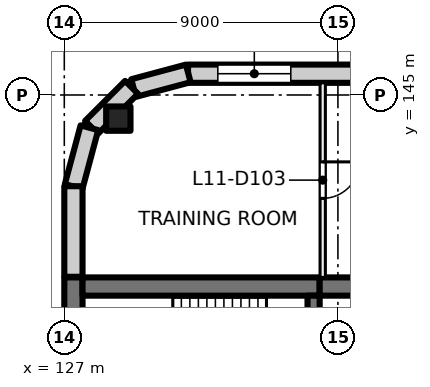
"""IFC4 building model, lengths in metres.
Left out: names, types, materials, properties, quantities, classifications, styles, units other than length and angle.
Written with IfcOpenShell. Run it as: python <this file> out.ifc"""

import sys

from ifc_helpers import new_model, si_unit, direction, frame, frame_2d, origin, origin_2d, place, context, subcontext, project, spatial, rectangle, extrude, element, fill, save


model = new_model("IFC4")
c1 = context("Model", 3, precision=1e-05, world=origin(), true_north=direction((0.0, 1.0)))
c2 = subcontext(c1, "Body", "Model", "MODEL_VIEW")
j1 = project(units=[si_unit("LENGTHUNIT", "METRE"), si_unit("PLANEANGLEUNIT", "RADIAN")], contexts=[c1])
p1 = place(None, origin())
s1 = spatial("IfcSite", under=j1, at=p1, CompositionType="ELEMENT")
p2 = place(p1, origin())
s2 = spatial("IfcBuilding", under=s1, at=p2, CompositionType="ELEMENT")
p3 = place(p2, frame((0.0, 0.0, 51.5)))
s3 = spatial("IfcBuildingStorey", under=s2, at=p3, CompositionType="ELEMENT", Elevation=51.5)
p4 = place(p3, frame((128.777, 144.223, 0.0), z_axis=(0.0, 0.0, 1.0), x_axis=(1.0, 0.0, 0.0)))
e1 = element("IfcColumn", 1, at=p4, inside=s3, PredefinedType="COLUMN", context=c2, shape_type="SweptSolid", body=[
    extrude(rectangle(XDim=0.8, YDim=0.8, at=origin_2d()), origin(), (0.0, 0.0, 1.0), 4.0),
])
p5 = place(p3, frame((127.3, 135.2, 0.0), z_axis=(0.0, 0.0, 1.0), x_axis=(0.0, 1.0, 0.0)))
e2 = element("IfcWall", 2, at=p5, inside=s3, PredefinedType="SHEAR", context=c2, shape_type="SweptSolid", body=[
    extrude(rectangle(XDim=3.8, YDim=0.6, at=frame_2d((1.9, 0.0))), origin(), (0.0, 0.0, 1.0), 4.0),
])
p6 = place(p3, frame((127.6, 138.7, 0.0), z_axis=(0.0, 0.0, 1.0), x_axis=(1.0, 0.0, 0.0)))
e3 = element("IfcWall", 3, at=p6, inside=s3, PredefinedType="SHEAR", context=c2, shape_type="SweptSolid", body=[
    extrude(rectangle(XDim=7.8, YDim=0.6, at=frame_2d((3.9, 0.0))), origin(), (0.0, 0.0, 1.0), 4.0),
])
p7 = place(p3, frame((135.4, 138.7, 0.0), z_axis=(0.0, 0.0, 1.0), x_axis=(1.0, 0.0, 0.0)))
e4 = element("IfcWall", 4, at=p7, inside=s3, PredefinedType="SHEAR", context=c2, shape_type="SweptSolid", body=[
    extrude(rectangle(XDim=4.6, YDim=0.6, at=frame_2d((2.3, 0.0))), origin(), (0.0, 0.0, 1.0), 4.0),
])
p8 = place(p3, frame((135.2, 135.6, 0.0), z_axis=(0.0, 0.0, 1.0), x_axis=(0.0, 1.0, 0.0)))
e5 = element("IfcWall", 5, at=p8, inside=s3, PredefinedType="SHEAR", context=c2, shape_type="SweptSolid", body=[
    extrude(rectangle(XDim=2.8, YDim=0.4, at=frame_2d((1.4, 0.0))), origin(), (0.0, 0.0, 1.0), 4.0),
])
p9 = place(p8, frame((0.9, 0.0, 0.0)))
e6 = element("IfcOpeningElement", 6, at=p9, cuts=e5, PredefinedType="OPENING", context=c2, shape_type="SweptSolid", body=[
    extrude(rectangle(XDim=1.0, YDim=2.1, at=frame_2d((0.5, 1.05))), frame((0.0, 0.21, 0.0), z_axis=(0.0, -1.0, 0.0), x_axis=(1.0, 0.0, 0.0)), (0.0, 0.0, 1.0), 0.42),
])
p10 = place(p3, frame((131.07, 145.7, 0.0), z_axis=(0.0, 0.0, 1.0), x_axis=(1.0, 0.0, 0.0)))
e7 = element("IfcWall", 7, at=p10, inside=s3, PredefinedType="SOLIDWALL", context=c2, shape_type="SweptSolid", body=[
    extrude(rectangle(XDim=31.93, YDim=0.6, at=frame_2d((15.965, 0.0))), origin(), (0.0, 0.0, 1.0), 3.625),
])
p11 = place(p10, frame((0.98, 0.0, 0.9)))
e8 = element("IfcOpeningElement", 8, at=p11, cuts=e7, PredefinedType="OPENING", context=c2, shape_type="SweptSolid", body=[
    extrude(rectangle(XDim=2.4, YDim=2.4, at=frame_2d((1.2, 1.2))), frame((0.0, 0.31, 0.0), z_axis=(0.0, -1.0, 0.0), x_axis=(1.0, 0.0, 0.0)), (0.0, 0.0, 1.0), 0.62),
])
p12 = place(p10, frame((5.48, 0.0, 0.9)))
e9 = element("IfcOpeningElement", 9, at=p12, cuts=e7, PredefinedType="OPENING", context=c2, shape_type="SweptSolid", body=[
    extrude(rectangle(XDim=2.4, YDim=2.4, at=frame_2d((1.2, 1.2))), frame((0.0, 0.31, 0.0), z_axis=(0.0, -1.0, 0.0), x_axis=(1.0, 0.0, 0.0)), (0.0, 0.0, 1.0), 0.62),
])
p13 = place(p10, frame((9.98, 0.0, 0.9)))
e10 = element("IfcOpeningElement", 10, at=p13, cuts=e7, PredefinedType="OPENING", context=c2, shape_type="SweptSolid", body=[
    extrude(rectangle(XDim=2.4, YDim=2.4, at=frame_2d((1.2, 1.2))), frame((0.0, 0.31, 0.0), z_axis=(0.0, -1.0, 0.0), x_axis=(1.0, 0.0, 0.0)), (0.0, 0.0, 1.0), 0.62),
])
p14 = place(p10, frame((14.48, 0.0, 0.9)))
e11 = element("IfcOpeningElement", 11, at=p14, cuts=e7, PredefinedType="OPENING", context=c2, shape_type="SweptSolid", body=[
    extrude(rectangle(XDim=2.4, YDim=2.4, at=frame_2d((1.2, 1.2))), frame((0.0, 0.31, 0.0), z_axis=(0.0, -1.0, 0.0), x_axis=(1.0, 0.0, 0.0)), (0.0, 0.0, 1.0), 0.62),
])
p15 = place(p10, frame((18.98, 0.0, 0.9)))
e12 = element("IfcOpeningElement", 12, at=p15, cuts=e7, PredefinedType="OPENING", context=c2, shape_type="SweptSolid", body=[
    extrude(rectangle(XDim=2.4, YDim=2.4, at=frame_2d((1.2, 1.2))), frame((0.0, 0.31, 0.0), z_axis=(0.0, -1.0, 0.0), x_axis=(1.0, 0.0, 0.0)), (0.0, 0.0, 1.0), 0.62),
])
p16 = place(p10, frame((23.48, 0.0, 0.9)))
e13 = element("IfcOpeningElement", 13, at=p16, cuts=e7, PredefinedType="OPENING", context=c2, shape_type="SweptSolid", body=[
    extrude(rectangle(XDim=2.4, YDim=2.4, at=frame_2d((1.2, 1.2))), frame((0.0, 0.31, 0.0), z_axis=(0.0, -1.0, 0.0), x_axis=(1.0, 0.0, 0.0)), (0.0, 0.0, 1.0), 0.62),
])
p17 = place(p10, frame((27.98, 0.0, 0.9)))
e14 = element("IfcOpeningElement", 14, at=p17, cuts=e7, PredefinedType="OPENING", context=c2, shape_type="SweptSolid", body=[
    extrude(rectangle(XDim=2.4, YDim=2.4, at=frame_2d((1.2, 1.2))), frame((0.0, 0.31, 0.0), z_axis=(0.0, -1.0, 0.0), x_axis=(1.0, 0.0, 0.0)), (0.0, 0.0, 1.0), 0.62),
])
for number, where, z_axis, x_axis in (
    (15, (129.281, 145.229, 0.0), (0.0, 0.0, 1.0), (0.966, 0.259, 0.0)),
    (16, (127.896, 143.936, 0.0), (0.0, 0.0, 1.0), (0.707, 0.707, 0.0)),
):
    element("IfcWall", number, at=place(p3, frame(where, z_axis=z_axis, x_axis=x_axis)), inside=s3, PredefinedType="SOLIDWALL", context=c2, shape_type="SweptSolid", body=[
        extrude(rectangle(XDim=1.861, YDim=0.6, at=frame_2d((0.93, 0.0))), origin(), (0.0, 0.0, 1.0), 3.625),
    ])
p18 = place(p3, frame((127.308, 141.99, 0.0), z_axis=(0.0, 0.0, 1.0), x_axis=(0.258839784042, 0.965920269068, 0.0)))
e17 = element("IfcWall", 17, at=p18, inside=s3, PredefinedType="SOLIDWALL", context=c2, shape_type="SweptSolid", body=[
    extrude(rectangle(XDim=2.0, YDim=0.6, at=frame_2d((1.0, 0.0))), origin(), (0.0, 0.0, 1.0), 3.625),
])
p19 = place(p3, frame((127.3, 139.02, 0.0), z_axis=(0.0, 0.0, 1.0), x_axis=(0.0, 1.0, 0.0)))
e18 = element("IfcWall", 18, at=p19, inside=s3, PredefinedType="SOLIDWALL", context=c2, shape_type="SweptSolid", body=[
    extrude(rectangle(XDim=2.98, YDim=0.6, at=frame_2d((1.49, 0.0))), origin(), (0.0, 0.0, 1.0), 3.625),
])
p20 = place(p3, frame((135.5, 145.4, 0.0), z_axis=(0.0, 0.0, 1.0), x_axis=(0.0, -1.0, 0.0)))
e19 = element("IfcWall", 19, at=p20, inside=s3, PredefinedType="PARTITIONING", context=c2, shape_type="SweptSolid", body=[
    extrude(rectangle(XDim=6.4, YDim=0.175, at=frame_2d((3.2, 0.0))), origin(), (0.0, 0.0, 1.0), 3.625),
])
p21 = place(p20, frame((2.6, 0.0, 0.0)))
e20 = element("IfcOpeningElement", 20, at=p21, cuts=e19, PredefinedType="OPENING", context=c2, shape_type="SweptSolid", body=[
    extrude(rectangle(XDim=1.2, YDim=2.1, at=frame_2d((0.6, 1.05))), frame((0.0, 0.097, 0.0), z_axis=(0.0, -1.0, 0.0), x_axis=(1.0, 0.0, 0.0)), (0.0, 0.0, 1.0), 0.195),
])
p22 = place(p11, origin())
e21 = element("IfcWindow", 21, at=p22, inside=s3, PartitioningType="SINGLE_PANEL", PredefinedType="WINDOW", context=c2, shape_type="SweptSolid", body=[
    extrude(rectangle(XDim=2.4, YDim=2.4, at=frame_2d((1.2, 1.2))), frame((0.0, 0.03, 0.0), z_axis=(0.0, -1.0, 0.0), x_axis=(1.0, 0.0, 0.0)), (0.0, 0.0, 1.0), 0.06),
])
fill(e8, e21)
p23 = place(p21, origin())
e22 = element("IfcDoor", 22, at=p23, inside=s3, OperationType="DOUBLE_DOOR_SINGLE_SWING", PredefinedType="DOOR", context=c2, shape_type="SweptSolid", body=[
    extrude(rectangle(XDim=1.2, YDim=2.1, at=frame_2d((0.6, 1.05))), frame((0.0, 0.025, 0.0), z_axis=(0.0, -1.0, 0.0), x_axis=(1.0, 0.0, 0.0)), (0.0, 0.0, 1.0), 0.05),
])
fill(e20, e22)
save(model, sys.argv[1])
